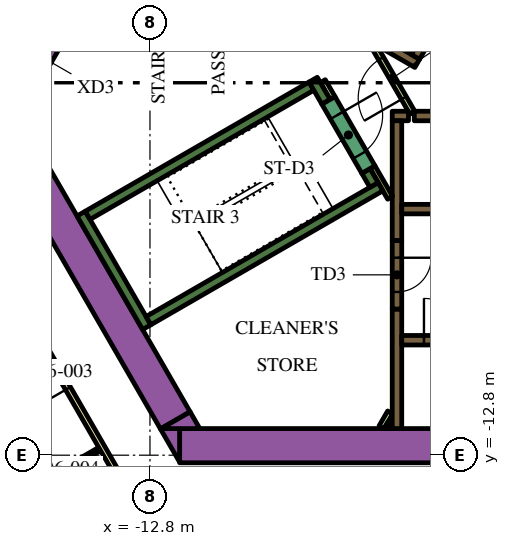
"""IFC4 building model, lengths in metres.
Left out: names, types, materials, properties, quantities, classifications, styles, units other than length and angle.
Written with IfcOpenShell. Run it as: python <this file> out.ifc"""

import sys

from ifc_helpers import new_model, si_unit, direction, frame, frame_2d, origin, place, context, subcontext, project, spatial, polyline, rectangle, outline, extrude, element, fill, save


model = new_model("IFC4")
c1 = context("Model", 3, precision=1e-05, world=origin(), true_north=direction((0.0, 1.0)))
c2 = subcontext(c1, "Body", "Model", "MODEL_VIEW")
j1 = project(units=[si_unit("LENGTHUNIT", "METRE"), si_unit("PLANEANGLEUNIT", "RADIAN")], contexts=[c1])
p1 = place(None, origin())
s1 = spatial("IfcSite", under=j1, at=p1, CompositionType="ELEMENT")
p2 = place(p1, origin())
s2 = spatial("IfcBuilding", under=s1, at=p2, CompositionType="ELEMENT")
p3 = place(p2, frame((0.0, 0.0, 83.7)))
s3 = spatial("IfcBuildingStorey", under=s2, at=p3, CompositionType="ELEMENT", Elevation=83.7)
p4 = place(p3, frame((-12.019, -12.55, 0.0), z_axis=(0.0, 0.0, 1.0), x_axis=(1.0, 0.0, 0.0)))
e1 = element("IfcWall", 1, at=p4, inside=s3, PredefinedType="SOLIDWALL", context=c2, shape_type="SweptSolid", body=[
    extrude(rectangle(XDim=21.63, YDim=0.9, at=frame_2d((10.815, 0.0))), origin(), (0.0, 0.0, 1.0), 3.9),
])
p5 = place(p3, origin())
e2 = element("IfcWall", 2, at=p5, inside=s3, PredefinedType="SOLIDWALL", context=c2, shape_type="SweptSolid", body=[
    extrude(outline(polyline([(-12.529, -12.1), (-12.021, -12.1), (-12.021, -12.98), (-12.529, -12.1)])), origin(), (0.0, 0.0, 1.0), 3.9),
])
p6 = place(p3, frame((-12.134, -11.883, 0.0), z_axis=(0.0, 0.0, 1.0), x_axis=(-0.500005339912, 0.866022320763, 0.0)))
e3 = element("IfcWall", 3, at=p6, inside=s3, PredefinedType="SOLIDWALL", context=c2, shape_type="SweptSolid", body=[
    extrude(rectangle(XDim=9.488, YDim=0.9, at=frame_2d((4.744, 0.0))), origin(), (0.0, 0.0, 1.0), 3.9),
])
e4 = element("IfcWall", 4, at=p5, inside=s3, PredefinedType="SOLIDWALL", context=c2, shape_type="SweptSolid", body=[
    extrude(outline(polyline([(-11.489, -12.1), (-12.505, -12.1), (-11.743, -11.66), (-11.489, -12.1)])), origin(), (0.0, 0.0, 1.0), 3.9),
])
p7 = place(p3, frame((-12.885, -9.431, 0.0), z_axis=(0.0, 0.0, 1.0), x_axis=(-0.500020560727, 0.866013532718, 0.0)))
e5 = element("IfcWall", 5, at=p7, inside=s3, PredefinedType="SOLIDWALL", context=c2, shape_type="SweptSolid", body=[
    extrude(rectangle(XDim=3.45, YDim=0.25, at=frame_2d((1.725, 0.0))), origin(), (0.0, 0.0, 1.0), 3.9),
])
p8 = place(p3, frame((-14.44, -6.49, 0.0), z_axis=(0.0, 0.0, 1.0), x_axis=(0.866022966069, 0.500004222222, 0.0)))
e6 = element("IfcWall", 6, at=p8, inside=s3, PredefinedType="SOLIDWALL", context=c2, shape_type="SweptSolid", body=[
    extrude(rectangle(XDim=6.8, YDim=0.25, at=frame_2d((3.4, 0.0))), origin(), (0.0, 0.0, 1.0), 3.9),
])
p9 = place(p3, frame((-8.168, -3.503, 0.0), z_axis=(0.0, 0.0, 1.0), x_axis=(-0.499952099219, 0.866053057547, 0.0)))
e7 = element("IfcWall", 7, at=p9, inside=s3, PredefinedType="SOLIDWALL", context=c2, shape_type="SweptSolid", body=[
    extrude(rectangle(XDim=0.675, YDim=0.25, at=frame_2d((0.337, 0.0))), origin(), (0.0, 0.0, 1.0), 3.9),
])
p10 = place(p3, frame((-12.84, -9.261, 0.0), z_axis=(0.0, 0.0, 1.0), x_axis=(0.866016039709, 0.500016218704, 0.0)))
e8 = element("IfcWall", 8, at=p10, inside=s3, PredefinedType="SOLIDWALL", context=c2, shape_type="SweptSolid", body=[
    extrude(rectangle(XDim=7.05, YDim=0.25, at=frame_2d((3.525, 0.0))), origin(), (0.0, 0.0, 1.0), 3.9),
])
p11 = place(p3, frame((-6.905, -5.69, 0.0), z_axis=(0.0, 0.0, 1.0), x_axis=(-0.500402024738, 0.865793170242, 0.0)))
e9 = element("IfcWall", 9, at=p11, inside=s3, PredefinedType="SOLIDWALL", context=c2, shape_type="SweptSolid", body=[
    extrude(rectangle(XDim=0.425, YDim=0.25, at=frame_2d((0.212, 0.0))), origin(), (0.0, 0.0, 1.0), 3.9),
])
p12 = place(p3, frame((-6.3, -12.1, 0.0), z_axis=(0.0, 0.0, 1.0), x_axis=(0.0, 1.0, 0.0)))
e10 = element("IfcWall", 10, at=p12, inside=s3, PredefinedType="SOLIDWALL", context=c2, shape_type="SweptSolid", body=[
    extrude(rectangle(XDim=3.146, YDim=0.25, at=frame_2d((1.573, 0.0))), origin(), (0.0, 0.0, 1.0), 3.9),
])
p13 = place(p3, frame((-5.845, -3.875, 0.0), z_axis=(0.0, 0.0, 1.0), x_axis=(1.0, 0.0, 0.0)))
e11 = element("IfcWall", 11, at=p13, inside=s3, PredefinedType="SOLIDWALL", context=c2, shape_type="SweptSolid", body=[
    extrude(rectangle(XDim=12.27, YDim=0.25, at=frame_2d((6.135, 0.0))), origin(), (0.0, 0.0, 1.0), 3.9),
])
p14 = place(p3, frame((-6.425, -3.875, 0.0), z_axis=(0.0, 0.0, 1.0), x_axis=(1.0, 0.0, 0.0)))
e12 = element("IfcWall", 12, at=p14, inside=s3, PredefinedType="SOLIDWALL", context=c2, shape_type="SweptSolid", body=[
    extrude(rectangle(XDim=0.428, YDim=0.25, at=frame_2d((0.214, 0.0))), origin(), (0.0, 0.0, 1.0), 3.9),
])
p15 = place(p3, frame((-6.3, -4.0, 0.0), z_axis=(0.0, 0.0, 1.0), x_axis=(0.0, -1.0, 0.0)))
e13 = element("IfcWall", 13, at=p15, inside=s3, PredefinedType="SOLIDWALL", context=c2, shape_type="SweptSolid", body=[
    extrude(rectangle(XDim=3.154, YDim=0.25, at=frame_2d((1.577, 0.0))), origin(), (0.0, 0.0, 1.0), 3.9),
])
e14 = element("IfcWall", 14, at=p5, inside=s3, PredefinedType="SOLIDWALL", context=c2, shape_type="SweptSolid", body=[
    extrude(outline(polyline([(-5.922, -2.257), (-5.922, -2.257), (-5.705, -2.382), (-5.83, -2.598), (-6.829, -2.021), (-6.88, -1.934), (-6.88, -1.934), (-6.93, -1.963), (-7.952, -1.373), (-7.827, -1.156), (-5.922, -2.257)])), origin(), (0.0, 0.0, 1.0), 3.9),
])
p16 = place(p3, frame((-6.708, -12.068, 0.0), z_axis=(0.0, 0.0, 1.0), x_axis=(0.500000789788, 0.8660249478, 0.0)))
e15 = element("IfcWall", 15, at=p16, inside=s3, PredefinedType="PARTITIONING", context=c2, shape_type="SweptSolid", body=[
    extrude(rectangle(XDim=0.456, YDim=0.15, at=frame_2d((0.228, 0.0))), origin(), (0.0, 0.0, 1.0), 2.75),
])
p17 = place(p3, frame((-6.534, -12.068, 0.0), z_axis=(0.0, 0.0, 1.0), x_axis=(0.500240224089, 0.865886665912, 0.0)))
e16 = element("IfcWall", 16, at=p17, inside=s3, PredefinedType="PARTITIONING", context=c2, shape_type="SweptSolid", body=[
    extrude(rectangle(XDim=0.109, YDim=0.15, at=frame_2d((0.054, 0.0))), origin(), (0.0, 0.0, 1.0), 2.75),
])
p18 = place(p3, frame((-6.48, -6.027, 0.0), z_axis=(0.0, 0.0, 1.0), x_axis=(-0.499927229454, 0.866067413802, 0.0)))
e17 = element("IfcWall", 17, at=p18, inside=s3, PredefinedType="PARTITIONING", context=c2, shape_type="SweptSolid", body=[
    extrude(rectangle(XDim=0.929, YDim=0.15, at=frame_2d((0.464, 0.0))), origin(), (0.0, 0.0, 1.0), 3.9),
])
p19 = place(p3, frame((-8.252, -2.958, 0.0), z_axis=(0.0, 0.0, 1.0), x_axis=(0.500174715838, -0.865924508047, 0.0)))
e18 = element("IfcWall", 18, at=p19, inside=s3, PredefinedType="PARTITIONING", context=c2, shape_type="SweptSolid", body=[
    extrude(rectangle(XDim=0.514, YDim=0.15, at=frame_2d((0.257, 0.0))), origin(), (0.0, 0.0, 1.0), 2.75),
])
p20 = place(p3, frame((-6.175, -9.775, 0.0), z_axis=(0.0, 0.0, 1.0), x_axis=(1.0, 0.0, 0.0)))
e19 = element("IfcWall", 19, at=p20, inside=s3, PredefinedType="SOLIDWALL", context=c2, shape_type="SweptSolid", body=[
    extrude(rectangle(XDim=12.35, YDim=0.25, at=frame_2d((6.175, 0.0))), origin(), (0.0, 0.0, 1.0), 3.9),
])
p21 = place(p20, frame((0.585, 0.0, 0.0)))
e20 = element("IfcOpeningElement", 20, at=p21, cuts=e19, PredefinedType="OPENING", context=c2, shape_type="SweptSolid", body=[
    extrude(rectangle(XDim=1.1, YDim=2.1, at=frame_2d((0.55, 1.05))), frame((0.0, 0.135, 0.0), z_axis=(0.0, -1.0, 0.0), x_axis=(1.0, 0.0, 0.0)), (0.0, 0.0, 1.0), 0.27),
])
p22 = place(p20, frame((3.105, 0.0, 0.0)))
e21 = element("IfcOpeningElement", 21, at=p22, cuts=e19, PredefinedType="OPENING", context=c2, shape_type="SweptSolid", body=[
    extrude(rectangle(XDim=1.1, YDim=2.1, at=frame_2d((0.55, 1.05))), frame((0.0, 0.135, 0.0), z_axis=(0.0, -1.0, 0.0), x_axis=(1.0, 0.0, 0.0)), (0.0, 0.0, 1.0), 0.27),
])
p23 = place(p20, frame((5.625, 0.0, 0.0)))
e22 = element("IfcOpeningElement", 22, at=p23, cuts=e19, PredefinedType="OPENING", context=c2, shape_type="SweptSolid", body=[
    extrude(rectangle(XDim=1.1, YDim=2.1, at=frame_2d((0.55, 1.05))), frame((0.0, 0.135, 0.0), z_axis=(0.0, -1.0, 0.0), x_axis=(1.0, 0.0, 0.0)), (0.0, 0.0, 1.0), 0.27),
])
p24 = place(p20, frame((8.145, 0.0, 0.0)))
e23 = element("IfcOpeningElement", 23, at=p24, cuts=e19, PredefinedType="OPENING", context=c2, shape_type="SweptSolid", body=[
    extrude(rectangle(XDim=1.1, YDim=2.1, at=frame_2d((0.55, 1.05))), frame((0.0, 0.135, 0.0), z_axis=(0.0, -1.0, 0.0), x_axis=(1.0, 0.0, 0.0)), (0.0, 0.0, 1.0), 0.27),
])
p25 = place(p20, frame((10.665, 0.0, 0.0)))
e24 = element("IfcOpeningElement", 24, at=p25, cuts=e19, PredefinedType="OPENING", context=c2, shape_type="SweptSolid", body=[
    extrude(rectangle(XDim=1.1, YDim=2.1, at=frame_2d((0.55, 1.05))), frame((0.0, 0.135, 0.0), z_axis=(0.0, -1.0, 0.0), x_axis=(1.0, 0.0, 0.0)), (0.0, 0.0, 1.0), 0.27),
])
p26 = place(p3, frame((-6.175, -6.325, 0.0), z_axis=(0.0, 0.0, 1.0), x_axis=(1.0, 0.0, 0.0)))
e25 = element("IfcWall", 25, at=p26, inside=s3, PredefinedType="SOLIDWALL", context=c2, shape_type="SweptSolid", body=[
    extrude(rectangle(XDim=12.35, YDim=0.25, at=frame_2d((6.175, 0.0))), origin(), (0.0, 0.0, 1.0), 3.9),
])
p27 = place(p26, frame((3.205, 0.0, 0.0)))
e26 = element("IfcOpeningElement", 26, at=p27, cuts=e25, PredefinedType="OPENING", context=c2, shape_type="SweptSolid", body=[
    extrude(rectangle(XDim=0.9, YDim=2.1, at=frame_2d((0.45, 1.05))), frame((0.0, 0.135, 0.0), z_axis=(0.0, -1.0, 0.0), x_axis=(1.0, 0.0, 0.0)), (0.0, 0.0, 1.0), 0.27),
])
p28 = place(p26, frame((8.145, 0.0, 0.0)))
e27 = element("IfcOpeningElement", 27, at=p28, cuts=e25, PredefinedType="OPENING", context=c2, shape_type="SweptSolid", body=[
    extrude(rectangle(XDim=1.1, YDim=2.1, at=frame_2d((0.55, 1.05))), frame((0.0, 0.135, 0.0), z_axis=(0.0, -1.0, 0.0), x_axis=(1.0, 0.0, 0.0)), (0.0, 0.0, 1.0), 0.27),
])
p29 = place(p26, frame((10.665, 0.0, 0.0)))
e28 = element("IfcOpeningElement", 28, at=p29, cuts=e25, PredefinedType="OPENING", context=c2, shape_type="SweptSolid", body=[
    extrude(rectangle(XDim=1.1, YDim=2.1, at=frame_2d((0.55, 1.05))), frame((0.0, 0.135, 0.0), z_axis=(0.0, -1.0, 0.0), x_axis=(1.0, 0.0, 0.0)), (0.0, 0.0, 1.0), 0.27),
])
p30 = place(p3, frame((-0.898, 6.194, 0.0), z_axis=(0.0, 0.0, 1.0), x_axis=(-0.499996202215, -0.866027596426, 0.0)))
e29 = element("IfcWall", 29, at=p30, inside=s3, PredefinedType="SOLIDWALL", context=c2, shape_type="SweptSolid", body=[
    extrude(rectangle(XDim=9.83, YDim=0.25, at=frame_2d((4.915, 0.0))), origin(), (0.0, 0.0, 1.0), 3.9),
])
p31 = place(p30, frame((0.585, 0.0, 0.0)))
e30 = element("IfcOpeningElement", 30, at=p31, cuts=e29, PredefinedType="OPENING", context=c2, shape_type="SweptSolid", body=[
    extrude(rectangle(XDim=1.1, YDim=2.1, at=frame_2d((0.55, 1.05))), frame((0.0, 0.135, 0.0), z_axis=(0.0, -1.0, 0.0), x_axis=(1.0, 0.0, 0.0)), (0.0, 0.0, 1.0), 0.27),
])
p32 = place(p30, frame((3.105, 0.0, 0.0)))
e31 = element("IfcOpeningElement", 31, at=p32, cuts=e29, PredefinedType="OPENING", context=c2, shape_type="SweptSolid", body=[
    extrude(rectangle(XDim=1.1, YDim=2.1, at=frame_2d((0.55, 1.05))), frame((0.0, 0.135, 0.0), z_axis=(0.0, -1.0, 0.0), x_axis=(1.0, 0.0, 0.0)), (0.0, 0.0, 1.0), 0.27),
])
p33 = place(p30, frame((5.625, 0.0, 0.0)))
e32 = element("IfcOpeningElement", 32, at=p33, cuts=e29, PredefinedType="OPENING", context=c2, shape_type="SweptSolid", body=[
    extrude(rectangle(XDim=1.1, YDim=2.1, at=frame_2d((0.55, 1.05))), frame((0.0, 0.135, 0.0), z_axis=(0.0, -1.0, 0.0), x_axis=(1.0, 0.0, 0.0)), (0.0, 0.0, 1.0), 0.27),
])
p34 = place(p30, frame((8.145, 0.0, 0.0)))
e33 = element("IfcOpeningElement", 33, at=p34, cuts=e29, PredefinedType="OPENING", context=c2, shape_type="SweptSolid", body=[
    extrude(rectangle(XDim=1.1, YDim=2.1, at=frame_2d((0.55, 1.05))), frame((0.0, 0.135, 0.0), z_axis=(0.0, -1.0, 0.0), x_axis=(1.0, 0.0, 0.0)), (0.0, 0.0, 1.0), 0.27),
])
p35 = place(p3, frame((-8.103, -3.466, 0.0), z_axis=(0.0, 0.0, 1.0), x_axis=(0.500078061341, -0.865980330357, 0.0)))
e34 = element("IfcWall", 34, at=p35, inside=s3, PredefinedType="SOLIDWALL", context=c2, shape_type="SweptSolid", body=[
    extrude(rectangle(XDim=2.1, YDim=0.4, at=frame_2d((1.05, 0.0))), origin(), (0.0, 0.0, 1.0), 3.9),
])
p36 = place(p35, frame((0.45, 0.0, 0.0)))
e35 = element("IfcOpeningElement", 35, at=p36, cuts=e34, PredefinedType="OPENING", context=c2, shape_type="SweptSolid", body=[
    extrude(rectangle(XDim=1.2, YDim=2.1, at=frame_2d((0.6, 1.05))), frame((0.0, 0.21, 0.0), z_axis=(0.0, -1.0, 0.0), x_axis=(1.0, 0.0, 0.0)), (0.0, 0.0, 1.0), 0.42),
])
p37 = place(p3, frame((-6.3, -7.154, 0.0), z_axis=(0.0, 0.0, 1.0), x_axis=(0.0, -1.0, 0.0)))
e36 = element("IfcWall", 36, at=p37, inside=s3, PredefinedType="SOLIDWALL", context=c2, shape_type="SweptSolid", body=[
    extrude(rectangle(XDim=1.8, YDim=0.25, at=frame_2d((0.9, 0.0))), origin(), (0.0, 0.0, 1.0), 3.9),
])
p38 = place(p37, frame((0.45, 0.0, 0.0)))
e37 = element("IfcOpeningElement", 37, at=p38, cuts=e36, PredefinedType="OPENING", context=c2, shape_type="SweptSolid", body=[
    extrude(rectangle(XDim=0.9, YDim=2.1, at=frame_2d((0.45, 1.05))), frame((0.0, 0.135, 0.0), z_axis=(0.0, -1.0, 0.0), x_axis=(1.0, 0.0, 0.0)), (0.0, 0.0, 1.0), 0.27),
])
p39 = place(p3, frame((-5.895, -3.79, 0.0), z_axis=(0.0, 0.0, 1.0), x_axis=(-0.49994051562, 0.866059744384, 0.0)))
e38 = element("IfcWall", 38, at=p39, inside=s3, PredefinedType="PARTITIONING", context=c2, shape_type="SweptSolid", body=[
    extrude(rectangle(XDim=2.1, YDim=0.15, at=frame_2d((1.05, 0.0))), origin(), (0.0, 0.0, 1.0), 2.75),
])
p40 = place(p39, frame((0.45, 0.0, 0.0)))
e39 = element("IfcOpeningElement", 39, at=p40, cuts=e38, PredefinedType="OPENING", context=c2, shape_type="SweptSolid", body=[
    extrude(rectangle(XDim=1.2, YDim=2.1, at=frame_2d((0.6, 1.05))), frame((0.0, 0.085, 0.0), z_axis=(0.0, -1.0, 0.0), x_axis=(1.0, 0.0, 0.0)), (0.0, 0.0, 1.0), 0.17),
])
p41 = place(p3, frame((-16.209, -2.976, 0.0), z_axis=(0.0, 0.0, 1.0), x_axis=(0.499954529098, 0.86605165483, 0.0)))
e40 = element("IfcWall", 40, at=p41, inside=s3, PredefinedType="SOLIDWALL", context=c2, shape_type="SweptSolid", body=[
    extrude(rectangle(XDim=1.7, YDim=0.9, at=frame_2d((0.85, 0.0))), origin(), (0.0, 0.0, 1.0), 3.9),
])
p42 = place(p41, frame((0.25, 0.0, 0.0)))
e41 = element("IfcOpeningElement", 41, at=p42, cuts=e40, PredefinedType="OPENING", context=c2, shape_type="SweptSolid", body=[
    extrude(rectangle(XDim=1.2, YDim=2.1, at=frame_2d((0.6, 1.05))), frame((0.0, 0.46, 0.0), z_axis=(0.0, -1.0, 0.0), x_axis=(1.0, 0.0, 0.0)), (0.0, 0.0, 1.0), 0.92),
])
p43 = place(p3, frame((-19.081, -3.9, 0.0), z_axis=(0.0, 0.0, 1.0), x_axis=(0.499998313975, 0.866026377209, 0.0)))
e42 = element("IfcWall", 42, at=p43, inside=s3, PredefinedType="PARTITIONING", context=c2, shape_type="SweptSolid", body=[
    extrude(rectangle(XDim=25.766, YDim=0.15, at=frame_2d((12.883, 0.0))), origin(), (0.0, 0.0, 1.0), 2.75),
])
p44 = place(p43, frame((19.306, 0.0, 0.0)))
e43 = element("IfcOpeningElement", 43, at=p44, cuts=e42, PredefinedType="OPENING", context=c2, shape_type="SweptSolid", body=[
    extrude(rectangle(XDim=1.0, YDim=2.1, at=frame_2d((0.5, 1.05))), frame((0.0, 0.085, 0.0), z_axis=(0.0, -1.0, 0.0), x_axis=(1.0, 0.0, 0.0)), (0.0, 0.0, 1.0), 0.17),
])
p45 = place(p43, frame((18.0, 0.0, 0.0)))
e44 = element("IfcOpeningElement", 44, at=p45, cuts=e42, PredefinedType="OPENING", context=c2, shape_type="SweptSolid", body=[
    extrude(rectangle(XDim=1.0, YDim=2.1, at=frame_2d((0.5, 1.05))), frame((0.0, 0.085, 0.0), z_axis=(0.0, -1.0, 0.0), x_axis=(1.0, 0.0, 0.0)), (0.0, 0.0, 1.0), 0.17),
])
p46 = place(p43, frame((10.874, 0.0, 0.0)))
e45 = element("IfcOpeningElement", 45, at=p46, cuts=e42, PredefinedType="OPENING", context=c2, shape_type="SweptSolid", body=[
    extrude(rectangle(XDim=0.9, YDim=2.1, at=frame_2d((0.45, 1.05))), frame((0.0, 0.085, 0.0), z_axis=(0.0, -1.0, 0.0), x_axis=(1.0, 0.0, 0.0)), (0.0, 0.0, 1.0), 0.17),
])
p47 = place(p43, frame((8.548, 0.0, 0.0)))
e46 = element("IfcOpeningElement", 46, at=p47, cuts=e42, PredefinedType="OPENING", context=c2, shape_type="SweptSolid", body=[
    extrude(rectangle(XDim=1.1, YDim=2.1, at=frame_2d((0.55, 1.05))), frame((0.0, 0.085, 0.0), z_axis=(0.0, -1.0, 0.0), x_axis=(1.0, 0.0, 0.0)), (0.0, 0.0, 1.0), 0.17),
])
p48 = place(p43, frame((0.18, 0.0, 0.0)))
e47 = element("IfcOpeningElement", 47, at=p48, cuts=e42, PredefinedType="OPENING", context=c2, shape_type="SweptSolid", body=[
    extrude(rectangle(XDim=1.0, YDim=2.1, at=frame_2d((0.5, 1.05))), frame((0.0, 0.085, 0.0), z_axis=(0.0, -1.0, 0.0), x_axis=(1.0, 0.0, 0.0)), (0.0, 0.0, 1.0), 0.17),
])
p49 = place(p3, frame((-12.918, -14.575, 0.0), z_axis=(0.0, 0.0, 1.0), x_axis=(-0.500009150678, 0.866020120573, 0.0)))
e48 = element("IfcWall", 48, at=p49, inside=s3, PredefinedType="PARTITIONING", context=c2, shape_type="SweptSolid", body=[
    extrude(rectangle(XDim=5.258, YDim=0.15, at=frame_2d((2.629, 0.0))), origin(), (0.0, 0.0, 1.0), 2.75),
])
p50 = place(p49, frame((4.078, 0.0, 0.0)))
e49 = element("IfcOpeningElement", 49, at=p50, cuts=e48, PredefinedType="OPENING", context=c2, shape_type="SweptSolid", body=[
    extrude(rectangle(XDim=1.0, YDim=2.1, at=frame_2d((0.5, 1.05))), frame((0.0, 0.085, 0.0), z_axis=(0.0, -1.0, 0.0), x_axis=(1.0, 0.0, 0.0)), (0.0, 0.0, 1.0), 0.17),
])
p51 = place(p3, frame((-14.123, -12.638, 0.0), z_axis=(0.0, 0.0, 1.0), x_axis=(-0.86599734893, -0.500048589285, 0.0)))
e50 = element("IfcWall", 50, at=p51, inside=s3, PredefinedType="PARTITIONING", context=c2, shape_type="SweptSolid", body=[
    extrude(rectangle(XDim=2.7, YDim=0.1, at=frame_2d((1.35, 0.0))), origin(), (0.0, 0.0, 1.0), 2.75),
])
p52 = place(p51, frame((0.6, 0.0, 0.0)))
e51 = element("IfcOpeningElement", 51, at=p52, cuts=e50, PredefinedType="OPENING", context=c2, shape_type="SweptSolid", body=[
    extrude(rectangle(XDim=0.9, YDim=2.1, at=frame_2d((0.45, 1.05))), frame((0.0, 0.06, 0.0), z_axis=(0.0, -1.0, 0.0), x_axis=(1.0, 0.0, 0.0)), (0.0, 0.0, 1.0), 0.12),
])
p53 = place(p21, origin())
e52 = element("IfcDoor", 52, at=p53, inside=s3, OperationType="DOUBLE_DOOR_SLIDING", PredefinedType="DOOR", context=c2, shape_type="SweptSolid", body=[
    extrude(rectangle(XDim=1.1, YDim=2.1, at=frame_2d((0.55, 1.05))), frame((0.0, 0.025, 0.0), z_axis=(0.0, -1.0, 0.0), x_axis=(1.0, 0.0, 0.0)), (0.0, 0.0, 1.0), 0.05),
])
fill(e20, e52)
p54 = place(p36, origin())
e53 = element("IfcDoor", 53, at=p54, inside=s3, OperationType="SINGLE_SWING_LEFT", PredefinedType="DOOR", context=c2, shape_type="SweptSolid", body=[
    extrude(rectangle(XDim=1.2, YDim=2.1, at=frame_2d((0.6, 1.05))), frame((0.0, 0.025, 0.0), z_axis=(0.0, -1.0, 0.0), x_axis=(1.0, 0.0, 0.0)), (0.0, 0.0, 1.0), 0.05),
])
fill(e35, e53)
p55 = place(p38, origin())
e54 = element("IfcDoor", 54, at=p55, inside=s3, OperationType="SINGLE_SWING_LEFT", PredefinedType="DOOR", context=c2, shape_type="SweptSolid", body=[
    extrude(rectangle(XDim=0.9, YDim=2.1, at=frame_2d((0.45, 1.05))), frame((0.0, 0.025, 0.0), z_axis=(0.0, -1.0, 0.0), x_axis=(1.0, 0.0, 0.0)), (0.0, 0.0, 1.0), 0.05),
])
fill(e37, e54)
p56 = place(p40, origin())
e55 = element("IfcDoor", 55, at=p56, inside=s3, OperationType="SINGLE_SWING_LEFT", PredefinedType="DOOR", context=c2, shape_type="SweptSolid", body=[
    extrude(rectangle(XDim=1.2, YDim=2.1, at=frame_2d((0.6, 1.05))), frame((0.0, 0.025, 0.0), z_axis=(0.0, -1.0, 0.0), x_axis=(1.0, 0.0, 0.0)), (0.0, 0.0, 1.0), 0.05),
])
fill(e39, e55)
p57 = place(p50, origin())
e56 = element("IfcDoor", 56, at=p57, inside=s3, OperationType="SINGLE_SWING_RIGHT", PredefinedType="DOOR", context=c2, shape_type="SweptSolid", body=[
    extrude(rectangle(XDim=1.0, YDim=2.1, at=frame_2d((0.5, 1.05))), frame((0.0, 0.025, 0.0), z_axis=(0.0, -1.0, 0.0), x_axis=(1.0, 0.0, 0.0)), (0.0, 0.0, 1.0), 0.05),
])
fill(e49, e56)
p58 = place(p52, origin())
e57 = element("IfcDoor", 57, at=p58, inside=s3, OperationType="SINGLE_SWING_LEFT", PredefinedType="DOOR", context=c2, shape_type="SweptSolid", body=[
    extrude(rectangle(XDim=0.9, YDim=2.1, at=frame_2d((0.45, 1.05))), frame((0.0, 0.025, 0.0), z_axis=(0.0, -1.0, 0.0), x_axis=(1.0, 0.0, 0.0)), (0.0, 0.0, 1.0), 0.05),
])
fill(e51, e57)
save(model, sys.argv[1])
